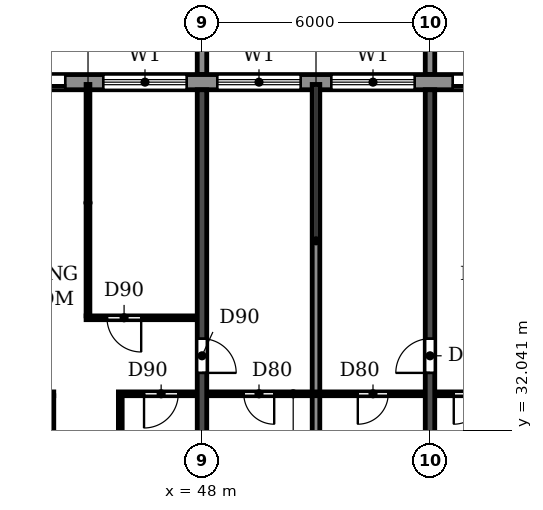
"""IFC4 building model, lengths in metres.
Left out: names, types, materials, properties, quantities, classifications, styles, units other than length and angle.
Written with IfcOpenShell. Run it as: python <this file> out.ifc"""

import sys

from ifc_helpers import new_model, si_unit, direction, frame, frame_2d, origin, place, context, subcontext, project, spatial, polyline, rectangle, outline, extrude, source, transform, mapped, element, fill, save


model = new_model("IFC4")
c1 = context("Model", 3, precision=1e-05, world=origin(), true_north=direction((0.0, 1.0)))
c2 = subcontext(c1, "Body", "Model", "MODEL_VIEW")
j1 = project(units=[si_unit("LENGTHUNIT", "METRE"), si_unit("PLANEANGLEUNIT", "RADIAN")], contexts=[c1])
p1 = place(None, origin())
s1 = spatial("IfcSite", under=j1, at=p1, CompositionType="ELEMENT")
p2 = place(p1, origin())
s2 = spatial("IfcBuilding", under=s1, at=p2, CompositionType="ELEMENT")
p3 = place(p2, frame((0.0, 0.0, 191.7)))
s3 = spatial("IfcBuildingStorey", under=s2, at=p3, CompositionType="ELEMENT", Elevation=191.7)
p4 = place(p3, frame((48.0, 30.5, 0.0), z_axis=(0.0, 0.0, 1.0), x_axis=(0.0, 1.0, 0.0)))
e1 = element("IfcWall", 1, at=p4, inside=s3, PredefinedType="SHEAR", context=c2, shape_type="SweptSolid", body=[
    extrude(rectangle(XDim=10.5, YDim=0.25, at=frame_2d((5.25, 0.0))), origin(), (0.0, 0.0, 1.0), 3.08),
])
p5 = place(p4, frame((3.05, 0.0, 0.0)))
e2 = element("IfcOpeningElement", 2, at=p5, cuts=e1, PredefinedType="OPENING", context=c2, shape_type="SweptSolid", body=[
    extrude(rectangle(XDim=0.9, YDim=2.1, at=frame_2d((0.45, 1.05))), frame((0.0, 0.135, 0.0), z_axis=(0.0, -1.0, 0.0), x_axis=(1.0, 0.0, 0.0)), (0.0, 0.0, 1.0), 0.27),
])
p6 = place(p3, frame((54.0, 30.5, 0.0), z_axis=(0.0, 0.0, 1.0), x_axis=(0.0, 1.0, 0.0)))
e3 = element("IfcWall", 3, at=p6, inside=s3, PredefinedType="SHEAR", context=c2, shape_type="SweptSolid", body=[
    extrude(rectangle(XDim=10.5, YDim=0.25, at=frame_2d((5.25, 0.0))), origin(), (0.0, 0.0, 1.0), 3.08),
])
p7 = place(p6, frame((3.05, 0.0, 0.0)))
e4 = element("IfcOpeningElement", 4, at=p7, cuts=e3, PredefinedType="OPENING", context=c2, shape_type="SweptSolid", body=[
    extrude(rectangle(XDim=0.9, YDim=2.1, at=frame_2d((0.45, 1.05))), frame((0.0, 0.135, 0.0), z_axis=(0.0, -1.0, 0.0), x_axis=(1.0, 0.0, 0.0)), (0.0, 0.0, 1.0), 0.27),
])
p8 = place(p3, frame((79.317, 41.2, 0.0), z_axis=(0.0, 0.0, 1.0), x_axis=(-1.0, 0.0, 0.0)))
e5 = element("IfcWall", 5, at=p8, inside=s3, PredefinedType="STANDARD", context=c2, shape_type="SweptSolid", body=[
    extrude(rectangle(XDim=56.634, YDim=0.4, at=frame_2d((28.317, 0.0))), origin(), (0.0, 0.0, 1.0), 3.08),
])
p9 = place(p8, frame((52.917, 0.0, 0.0)))
e6 = element("IfcOpeningElement", 6, at=p9, cuts=e5, PredefinedType="OPENING", context=c2, shape_type="SweptSolid", body=[
    extrude(rectangle(XDim=1.8, YDim=2.4, at=frame_2d((0.9, 1.2))), frame((0.0, 0.21, 0.0), z_axis=(0.0, -1.0, 0.0), x_axis=(1.0, 0.0, 0.0)), (0.0, 0.0, 1.0), 0.42),
])
p10 = place(p8, frame((49.717, 0.0, 0.9)))
e7 = element("IfcOpeningElement", 7, at=p10, cuts=e5, PredefinedType="OPENING", context=c2, shape_type="SweptSolid", body=[
    extrude(rectangle(XDim=2.2, YDim=1.5, at=frame_2d((1.1, 0.75))), frame((0.0, 0.21, 0.0), z_axis=(0.0, -1.0, 0.0), x_axis=(1.0, 0.0, 0.0)), (0.0, 0.0, 1.0), 0.42),
])
p11 = place(p8, frame((46.917, 0.0, 0.0)))
e8 = element("IfcOpeningElement", 8, at=p11, cuts=e5, PredefinedType="OPENING", context=c2, shape_type="SweptSolid", body=[
    extrude(rectangle(XDim=1.8, YDim=2.4, at=frame_2d((0.9, 1.2))), frame((0.0, 0.21, 0.0), z_axis=(0.0, -1.0, 0.0), x_axis=(1.0, 0.0, 0.0)), (0.0, 0.0, 1.0), 0.42),
])
p12 = place(p8, frame((43.717, 0.0, 0.9)))
e9 = element("IfcOpeningElement", 9, at=p12, cuts=e5, PredefinedType="OPENING", context=c2, shape_type="SweptSolid", body=[
    extrude(rectangle(XDim=2.2, YDim=1.5, at=frame_2d((1.1, 0.75))), frame((0.0, 0.21, 0.0), z_axis=(0.0, -1.0, 0.0), x_axis=(1.0, 0.0, 0.0)), (0.0, 0.0, 1.0), 0.42),
])
p13 = place(p8, frame((40.717, 0.0, 0.9)))
e10 = element("IfcOpeningElement", 10, at=p13, cuts=e5, PredefinedType="OPENING", context=c2, shape_type="SweptSolid", body=[
    extrude(rectangle(XDim=2.2, YDim=1.5, at=frame_2d((1.1, 0.75))), frame((0.0, 0.21, 0.0), z_axis=(0.0, -1.0, 0.0), x_axis=(1.0, 0.0, 0.0)), (0.0, 0.0, 1.0), 0.42),
])
p14 = place(p8, frame((37.717, 0.0, 0.9)))
e11 = element("IfcOpeningElement", 11, at=p14, cuts=e5, PredefinedType="OPENING", context=c2, shape_type="SweptSolid", body=[
    extrude(rectangle(XDim=2.2, YDim=1.5, at=frame_2d((1.1, 0.75))), frame((0.0, 0.21, 0.0), z_axis=(0.0, -1.0, 0.0), x_axis=(1.0, 0.0, 0.0)), (0.0, 0.0, 1.0), 0.42),
])
p15 = place(p8, frame((34.917, 0.0, 0.0)))
e12 = element("IfcOpeningElement", 12, at=p15, cuts=e5, PredefinedType="OPENING", context=c2, shape_type="SweptSolid", body=[
    extrude(rectangle(XDim=1.8, YDim=2.4, at=frame_2d((0.9, 1.2))), frame((0.0, 0.21, 0.0), z_axis=(0.0, -1.0, 0.0), x_axis=(1.0, 0.0, 0.0)), (0.0, 0.0, 1.0), 0.42),
])
p16 = place(p8, frame((31.717, 0.0, 0.9)))
e13 = element("IfcOpeningElement", 13, at=p16, cuts=e5, PredefinedType="OPENING", context=c2, shape_type="SweptSolid", body=[
    extrude(rectangle(XDim=2.2, YDim=1.5, at=frame_2d((1.1, 0.75))), frame((0.0, 0.21, 0.0), z_axis=(0.0, -1.0, 0.0), x_axis=(1.0, 0.0, 0.0)), (0.0, 0.0, 1.0), 0.42),
])
p17 = place(p8, frame((28.717, 0.0, 0.9)))
e14 = element("IfcOpeningElement", 14, at=p17, cuts=e5, PredefinedType="OPENING", context=c2, shape_type="SweptSolid", body=[
    extrude(rectangle(XDim=2.2, YDim=1.5, at=frame_2d((1.1, 0.75))), frame((0.0, 0.21, 0.0), z_axis=(0.0, -1.0, 0.0), x_axis=(1.0, 0.0, 0.0)), (0.0, 0.0, 1.0), 0.42),
])
p18 = place(p8, frame((25.717, 0.0, 0.9)))
e15 = element("IfcOpeningElement", 15, at=p18, cuts=e5, PredefinedType="OPENING", context=c2, shape_type="SweptSolid", body=[
    extrude(rectangle(XDim=2.2, YDim=1.5, at=frame_2d((1.1, 0.75))), frame((0.0, 0.21, 0.0), z_axis=(0.0, -1.0, 0.0), x_axis=(1.0, 0.0, 0.0)), (0.0, 0.0, 1.0), 0.42),
])
p19 = place(p8, frame((22.917, 0.0, 0.0)))
e16 = element("IfcOpeningElement", 16, at=p19, cuts=e5, PredefinedType="OPENING", context=c2, shape_type="SweptSolid", body=[
    extrude(rectangle(XDim=1.8, YDim=2.4, at=frame_2d((0.9, 1.2))), frame((0.0, 0.21, 0.0), z_axis=(0.0, -1.0, 0.0), x_axis=(1.0, 0.0, 0.0)), (0.0, 0.0, 1.0), 0.42),
])
p20 = place(p8, frame((19.717, 0.0, 0.9)))
e17 = element("IfcOpeningElement", 17, at=p20, cuts=e5, PredefinedType="OPENING", context=c2, shape_type="SweptSolid", body=[
    extrude(rectangle(XDim=2.2, YDim=1.5, at=frame_2d((1.1, 0.75))), frame((0.0, 0.21, 0.0), z_axis=(0.0, -1.0, 0.0), x_axis=(1.0, 0.0, 0.0)), (0.0, 0.0, 1.0), 0.42),
])
p21 = place(p8, frame((16.717, 0.0, 0.9)))
e18 = element("IfcOpeningElement", 18, at=p21, cuts=e5, PredefinedType="OPENING", context=c2, shape_type="SweptSolid", body=[
    extrude(rectangle(XDim=2.2, YDim=1.5, at=frame_2d((1.1, 0.75))), frame((0.0, 0.21, 0.0), z_axis=(0.0, -1.0, 0.0), x_axis=(1.0, 0.0, 0.0)), (0.0, 0.0, 1.0), 0.42),
])
p22 = place(p8, frame((13.717, 0.0, 0.9)))
e19 = element("IfcOpeningElement", 19, at=p22, cuts=e5, PredefinedType="OPENING", context=c2, shape_type="SweptSolid", body=[
    extrude(rectangle(XDim=2.2, YDim=1.5, at=frame_2d((1.1, 0.75))), frame((0.0, 0.21, 0.0), z_axis=(0.0, -1.0, 0.0), x_axis=(1.0, 0.0, 0.0)), (0.0, 0.0, 1.0), 0.42),
])
p23 = place(p8, frame((10.717, 0.0, 0.9)))
e20 = element("IfcOpeningElement", 20, at=p23, cuts=e5, PredefinedType="OPENING", context=c2, shape_type="SweptSolid", body=[
    extrude(rectangle(XDim=2.2, YDim=1.5, at=frame_2d((1.1, 0.75))), frame((0.0, 0.21, 0.0), z_axis=(0.0, -1.0, 0.0), x_axis=(1.0, 0.0, 0.0)), (0.0, 0.0, 1.0), 0.42),
])
p24 = place(p8, frame((7.917, 0.0, 0.0)))
e21 = element("IfcOpeningElement", 21, at=p24, cuts=e5, PredefinedType="OPENING", context=c2, shape_type="SweptSolid", body=[
    extrude(rectangle(XDim=1.8, YDim=2.4, at=frame_2d((0.9, 1.2))), frame((0.0, 0.21, 0.0), z_axis=(0.0, -1.0, 0.0), x_axis=(1.0, 0.0, 0.0)), (0.0, 0.0, 1.0), 0.42),
])
p25 = place(p8, frame((4.717, 0.0, 0.9)))
e22 = element("IfcOpeningElement", 22, at=p25, cuts=e5, PredefinedType="OPENING", context=c2, shape_type="SweptSolid", body=[
    extrude(rectangle(XDim=2.2, YDim=1.5, at=frame_2d((1.1, 0.75))), frame((0.0, 0.21, 0.0), z_axis=(0.0, -1.0, 0.0), x_axis=(1.0, 0.0, 0.0)), (0.0, 0.0, 1.0), 0.42),
])
p26 = place(p8, frame((1.917, 0.0, 0.0)))
e23 = element("IfcOpeningElement", 23, at=p26, cuts=e5, PredefinedType="OPENING", context=c2, shape_type="SweptSolid", body=[
    extrude(rectangle(XDim=1.8, YDim=2.4, at=frame_2d((0.9, 1.2))), frame((0.0, 0.21, 0.0), z_axis=(0.0, -1.0, 0.0), x_axis=(1.0, 0.0, 0.0)), (0.0, 0.0, 1.0), 0.42),
])
m1 = source(origin(), c2, "Body", "SweptSolid", [
    extrude(outline(polyline([(0.0, 0.0), (0.25, 0.0), (0.25, 3.1), (0.0, 3.1), (0.0, 0.0)])), origin(), (0.0, 0.0, 1.0), 3.1),
])
for number, where in (
    (24, (47.875, 41.4, 0.0)),
    (25, (53.875, 41.4, 0.0)),
):
    element("IfcWall", number, at=place(p3, frame(where)), inside=s3, PredefinedType="STANDARD", context=c2, shape_type="MappedRepresentation", body=[
        mapped(m1, transform((0.0, 0.0, 0.0))),
    ])
p27 = place(p3, frame((51.0, 30.51, 0.0), z_axis=(0.0, 0.0, 1.0), x_axis=(0.0, 1.0, 0.0)))
e26 = element("IfcWall", 26, at=p27, inside=s3, PredefinedType="PARTITIONING", context=c2, shape_type="SweptSolid", body=[
    extrude(rectangle(XDim=10.63, YDim=0.2, at=frame_2d((5.315, 0.0))), origin(), (0.0, 0.0, 1.0), 3.08),
])
p28 = place(p3, frame((42.135, 33.0, 0.0), z_axis=(0.0, 0.0, 1.0), x_axis=(1.0, 0.0, 0.0)))
e27 = element("IfcWall", 27, at=p28, inside=s3, PredefinedType="PARTITIONING", context=c2, shape_type="SweptSolid", body=[
    extrude(rectangle(XDim=1.965, YDim=0.1, at=frame_2d((0.982, 0.0))), origin(), (0.0, 0.0, 1.0), 3.08),
])
p29 = place(p28, frame((0.49, 0.0, 0.0)))
e28 = element("IfcOpeningElement", 28, at=p29, cuts=e27, PredefinedType="OPENING", context=c2, shape_type="SweptSolid", body=[
    extrude(rectangle(XDim=0.8, YDim=2.1, at=frame_2d((0.4, 1.05))), frame((0.0, 0.06, 0.0), z_axis=(0.0, -1.0, 0.0), x_axis=(1.0, 0.0, 0.0)), (0.0, 0.0, 1.0), 0.12),
])
p30 = place(p3, frame((45.8, 33.0, 0.0), z_axis=(0.0, 0.0, 1.0), x_axis=(1.0, 0.0, 0.0)))
e29 = element("IfcWall", 29, at=p30, inside=s3, PredefinedType="PARTITIONING", context=c2, shape_type="SweptSolid", body=[
    extrude(rectangle(XDim=2.065, YDim=0.1, at=frame_2d((1.032, 0.0))), origin(), (0.0, 0.0, 1.0), 3.08),
])
p31 = place(p30, frame((0.675, 0.0, 0.0)))
e30 = element("IfcOpeningElement", 30, at=p31, cuts=e29, PredefinedType="OPENING", context=c2, shape_type="SweptSolid", body=[
    extrude(rectangle(XDim=0.9, YDim=2.1, at=frame_2d((0.45, 1.05))), frame((0.0, 0.06, 0.0), z_axis=(0.0, -1.0, 0.0), x_axis=(1.0, 0.0, 0.0)), (0.0, 0.0, 1.0), 0.12),
])
p32 = place(p3, frame((48.135, 33.0, 0.0), z_axis=(0.0, 0.0, 1.0), x_axis=(1.0, 0.0, 0.0)))
e31 = element("IfcWall", 31, at=p32, inside=s3, PredefinedType="PARTITIONING", context=c2, shape_type="SweptSolid", body=[
    extrude(rectangle(XDim=5.73, YDim=0.1, at=frame_2d((2.865, 0.0))), origin(), (0.0, 0.0, 1.0), 3.08),
])
p33 = place(p32, frame((0.965, 0.0, 0.0)))
e32 = element("IfcOpeningElement", 32, at=p33, cuts=e31, PredefinedType="OPENING", context=c2, shape_type="SweptSolid", body=[
    extrude(rectangle(XDim=0.8, YDim=2.1, at=frame_2d((0.4, 1.05))), frame((0.0, 0.06, 0.0), z_axis=(0.0, -1.0, 0.0), x_axis=(1.0, 0.0, 0.0)), (0.0, 0.0, 1.0), 0.12),
])
p34 = place(p32, frame((3.965, 0.0, 0.0)))
e33 = element("IfcOpeningElement", 33, at=p34, cuts=e31, PredefinedType="OPENING", context=c2, shape_type="SweptSolid", body=[
    extrude(rectangle(XDim=0.8, YDim=2.1, at=frame_2d((0.4, 1.05))), frame((0.0, 0.06, 0.0), z_axis=(0.0, -1.0, 0.0), x_axis=(1.0, 0.0, 0.0)), (0.0, 0.0, 1.0), 0.12),
])
p35 = place(p3, frame((54.135, 33.0, 0.0), z_axis=(0.0, 0.0, 1.0), x_axis=(1.0, 0.0, 0.0)))
e34 = element("IfcWall", 34, at=p35, inside=s3, PredefinedType="PARTITIONING", context=c2, shape_type="SweptSolid", body=[
    extrude(rectangle(XDim=1.965, YDim=0.1, at=frame_2d((0.982, 0.0))), origin(), (0.0, 0.0, 1.0), 3.08),
])
p36 = place(p35, frame((0.49, 0.0, 0.0)))
e35 = element("IfcOpeningElement", 35, at=p36, cuts=e34, PredefinedType="OPENING", context=c2, shape_type="SweptSolid", body=[
    extrude(rectangle(XDim=0.8, YDim=2.1, at=frame_2d((0.4, 1.05))), frame((0.0, 0.06, 0.0), z_axis=(0.0, -1.0, 0.0), x_axis=(1.0, 0.0, 0.0)), (0.0, 0.0, 1.0), 0.12),
])
p37 = place(p3, frame((44.95, 35.0, 0.0), z_axis=(0.0, 0.0, 1.0), x_axis=(1.0, 0.0, 0.0)))
e36 = element("IfcWall", 36, at=p37, inside=s3, PredefinedType="PARTITIONING", context=c2, shape_type="SweptSolid", body=[
    extrude(rectangle(XDim=2.915, YDim=0.1, at=frame_2d((1.458, 0.0))), origin(), (0.0, 0.0, 1.0), 3.08),
])
p38 = place(p37, frame((0.55, 0.0, 0.0)))
e37 = element("IfcOpeningElement", 37, at=p38, cuts=e36, PredefinedType="OPENING", context=c2, shape_type="SweptSolid", body=[
    extrude(rectangle(XDim=0.9, YDim=2.1, at=frame_2d((0.45, 1.05))), frame((0.0, 0.06, 0.0), z_axis=(0.0, -1.0, 0.0), x_axis=(1.0, 0.0, 0.0)), (0.0, 0.0, 1.0), 0.12),
])
p39 = place(p3, frame((44.05, 30.51, 0.0), z_axis=(0.0, 0.0, 1.0), x_axis=(0.0, 1.0, 0.0)))
e38 = element("IfcWall", 38, at=p39, inside=s3, PredefinedType="PARTITIONING", context=c2, shape_type="SweptSolid", body=[
    extrude(rectangle(XDim=2.44, YDim=0.1, at=frame_2d((1.22, 0.0))), origin(), (0.0, 0.0, 1.0), 3.08),
])
p40 = place(p3, frame((45.0, 35.05, 0.0), z_axis=(0.0, 0.0, 1.0), x_axis=(0.0, 1.0, 0.0)))
e39 = element("IfcWall", 39, at=p40, inside=s3, PredefinedType="PARTITIONING", context=c2, shape_type="SweptSolid", body=[
    extrude(rectangle(XDim=6.09, YDim=0.1, at=frame_2d((3.045, 0.0))), origin(), (0.0, 0.0, 1.0), 3.08),
])
p41 = place(p3, frame((45.85, 30.51, 0.0), z_axis=(0.0, 0.0, 1.0), x_axis=(0.0, 1.0, 0.0)))
e40 = element("IfcWall", 40, at=p41, inside=s3, PredefinedType="PARTITIONING", context=c2, shape_type="SweptSolid", body=[
    extrude(rectangle(XDim=2.44, YDim=0.1, at=frame_2d((1.22, 0.0))), origin(), (0.0, 0.0, 1.0), 3.08),
])
p42 = place(p15, origin())
e41 = element("IfcDoor", 41, at=p42, inside=s3, OperationType="DOUBLE_DOOR_SLIDING", PredefinedType="DOOR", context=c2, shape_type="SweptSolid", body=[
    extrude(rectangle(XDim=1.8, YDim=2.4, at=frame_2d((0.9, 1.2))), frame((0.0, 0.025, 0.0), z_axis=(0.0, -1.0, 0.0), x_axis=(1.0, 0.0, 0.0)), (0.0, 0.0, 1.0), 0.05),
])
fill(e12, e41)
p43 = place(p16, origin())
e42 = element("IfcWindow", 42, at=p43, inside=s3, PartitioningType="DOUBLE_PANEL_HORIZONTAL", PredefinedType="WINDOW", context=c2, shape_type="SweptSolid", body=[
    extrude(rectangle(XDim=2.2, YDim=1.5, at=frame_2d((1.1, 0.75))), frame((0.0, 0.03, 0.0), z_axis=(0.0, -1.0, 0.0), x_axis=(1.0, 0.0, 0.0)), (0.0, 0.0, 1.0), 0.06),
])
fill(e13, e42)
p44 = place(p17, origin())
e43 = element("IfcWindow", 43, at=p44, inside=s3, PartitioningType="DOUBLE_PANEL_HORIZONTAL", PredefinedType="WINDOW", context=c2, shape_type="SweptSolid", body=[
    extrude(rectangle(XDim=2.2, YDim=1.5, at=frame_2d((1.1, 0.75))), frame((0.0, 0.03, 0.0), z_axis=(0.0, -1.0, 0.0), x_axis=(1.0, 0.0, 0.0)), (0.0, 0.0, 1.0), 0.06),
])
fill(e14, e43)
p45 = place(p18, origin())
e44 = element("IfcWindow", 44, at=p45, inside=s3, PartitioningType="DOUBLE_PANEL_HORIZONTAL", PredefinedType="WINDOW", context=c2, shape_type="SweptSolid", body=[
    extrude(rectangle(XDim=2.2, YDim=1.5, at=frame_2d((1.1, 0.75))), frame((0.0, 0.03, 0.0), z_axis=(0.0, -1.0, 0.0), x_axis=(1.0, 0.0, 0.0)), (0.0, 0.0, 1.0), 0.06),
])
fill(e15, e44)
p46 = place(p19, origin())
e45 = element("IfcDoor", 45, at=p46, inside=s3, OperationType="DOUBLE_DOOR_SLIDING", PredefinedType="DOOR", context=c2, shape_type="SweptSolid", body=[
    extrude(rectangle(XDim=1.8, YDim=2.4, at=frame_2d((0.9, 1.2))), frame((0.0, 0.025, 0.0), z_axis=(0.0, -1.0, 0.0), x_axis=(1.0, 0.0, 0.0)), (0.0, 0.0, 1.0), 0.05),
])
fill(e16, e45)
p47 = place(p33, frame((0.8, 0.0, 0.0), z_axis=(0.0, 0.0, 1.0), x_axis=(-1.0, 0.0, 0.0)))
e46 = element("IfcDoor", 46, at=p47, inside=s3, OperationType="SINGLE_SWING_LEFT", PredefinedType="DOOR", context=c2, shape_type="SweptSolid", body=[
    extrude(rectangle(XDim=0.8, YDim=2.1, at=frame_2d((0.4, 1.05))), frame((0.0, 0.025, 0.0), z_axis=(0.0, -1.0, 0.0), x_axis=(1.0, 0.0, 0.0)), (0.0, 0.0, 1.0), 0.05),
])
fill(e32, e46)
p48 = place(p38, frame((0.9, 0.0, 0.0), z_axis=(0.0, 0.0, 1.0), x_axis=(-1.0, 0.0, 0.0)))
e47 = element("IfcDoor", 47, at=p48, inside=s3, OperationType="SINGLE_SWING_LEFT", PredefinedType="DOOR", context=c2, shape_type="SweptSolid", body=[
    extrude(rectangle(XDim=0.9, YDim=2.1, at=frame_2d((0.45, 1.05))), frame((0.0, 0.025, 0.0), z_axis=(0.0, -1.0, 0.0), x_axis=(1.0, 0.0, 0.0)), (0.0, 0.0, 1.0), 0.05),
])
fill(e37, e47)
p49 = place(p31, frame((0.9, 0.0, 0.0), z_axis=(0.0, 0.0, 1.0), x_axis=(-1.0, 0.0, 0.0)))
e48 = element("IfcDoor", 48, at=p49, inside=s3, OperationType="SINGLE_SWING_RIGHT", PredefinedType="DOOR", context=c2, shape_type="SweptSolid", body=[
    extrude(rectangle(XDim=0.9, YDim=2.1, at=frame_2d((0.45, 1.05))), frame((0.0, 0.025, 0.0), z_axis=(0.0, -1.0, 0.0), x_axis=(1.0, 0.0, 0.0)), (0.0, 0.0, 1.0), 0.05),
])
fill(e30, e48)
p50 = place(p5, frame((0.9, 0.0, 0.0), z_axis=(0.0, 0.0, 1.0), x_axis=(-1.0, 0.0, 0.0)))
e49 = element("IfcDoor", 49, at=p50, inside=s3, OperationType="SINGLE_SWING_RIGHT", PredefinedType="DOOR", context=c2, shape_type="SweptSolid", body=[
    extrude(rectangle(XDim=0.9, YDim=2.1, at=frame_2d((0.45, 1.05))), frame((0.0, 0.025, 0.0), z_axis=(0.0, -1.0, 0.0), x_axis=(1.0, 0.0, 0.0)), (0.0, 0.0, 1.0), 0.05),
])
fill(e2, e49)
p51 = place(p34, frame((0.8, 0.0, 0.0), z_axis=(0.0, 0.0, 1.0), x_axis=(-1.0, 0.0, 0.0)))
e50 = element("IfcDoor", 50, at=p51, inside=s3, OperationType="SINGLE_SWING_RIGHT", PredefinedType="DOOR", context=c2, shape_type="SweptSolid", body=[
    extrude(rectangle(XDim=0.8, YDim=2.1, at=frame_2d((0.4, 1.05))), frame((0.0, 0.025, 0.0), z_axis=(0.0, -1.0, 0.0), x_axis=(1.0, 0.0, 0.0)), (0.0, 0.0, 1.0), 0.05),
])
fill(e33, e50)
p52 = place(p7, origin())
e51 = element("IfcDoor", 51, at=p52, inside=s3, OperationType="SINGLE_SWING_LEFT", PredefinedType="DOOR", context=c2, shape_type="SweptSolid", body=[
    extrude(rectangle(XDim=0.9, YDim=2.1, at=frame_2d((0.45, 1.05))), frame((0.0, 0.025, 0.0), z_axis=(0.0, -1.0, 0.0), x_axis=(1.0, 0.0, 0.0)), (0.0, 0.0, 1.0), 0.05),
])
fill(e4, e51)
p53 = place(p36, frame((0.8, 0.0, 0.0), z_axis=(0.0, 0.0, 1.0), x_axis=(-1.0, 0.0, 0.0)))
e52 = element("IfcDoor", 52, at=p53, inside=s3, OperationType="SINGLE_SWING_RIGHT", PredefinedType="DOOR", context=c2, shape_type="SweptSolid", body=[
    extrude(rectangle(XDim=0.8, YDim=2.1, at=frame_2d((0.4, 1.05))), frame((0.0, 0.025, 0.0), z_axis=(0.0, -1.0, 0.0), x_axis=(1.0, 0.0, 0.0)), (0.0, 0.0, 1.0), 0.05),
])
fill(e35, e52)
save(model, sys.argv[1])
